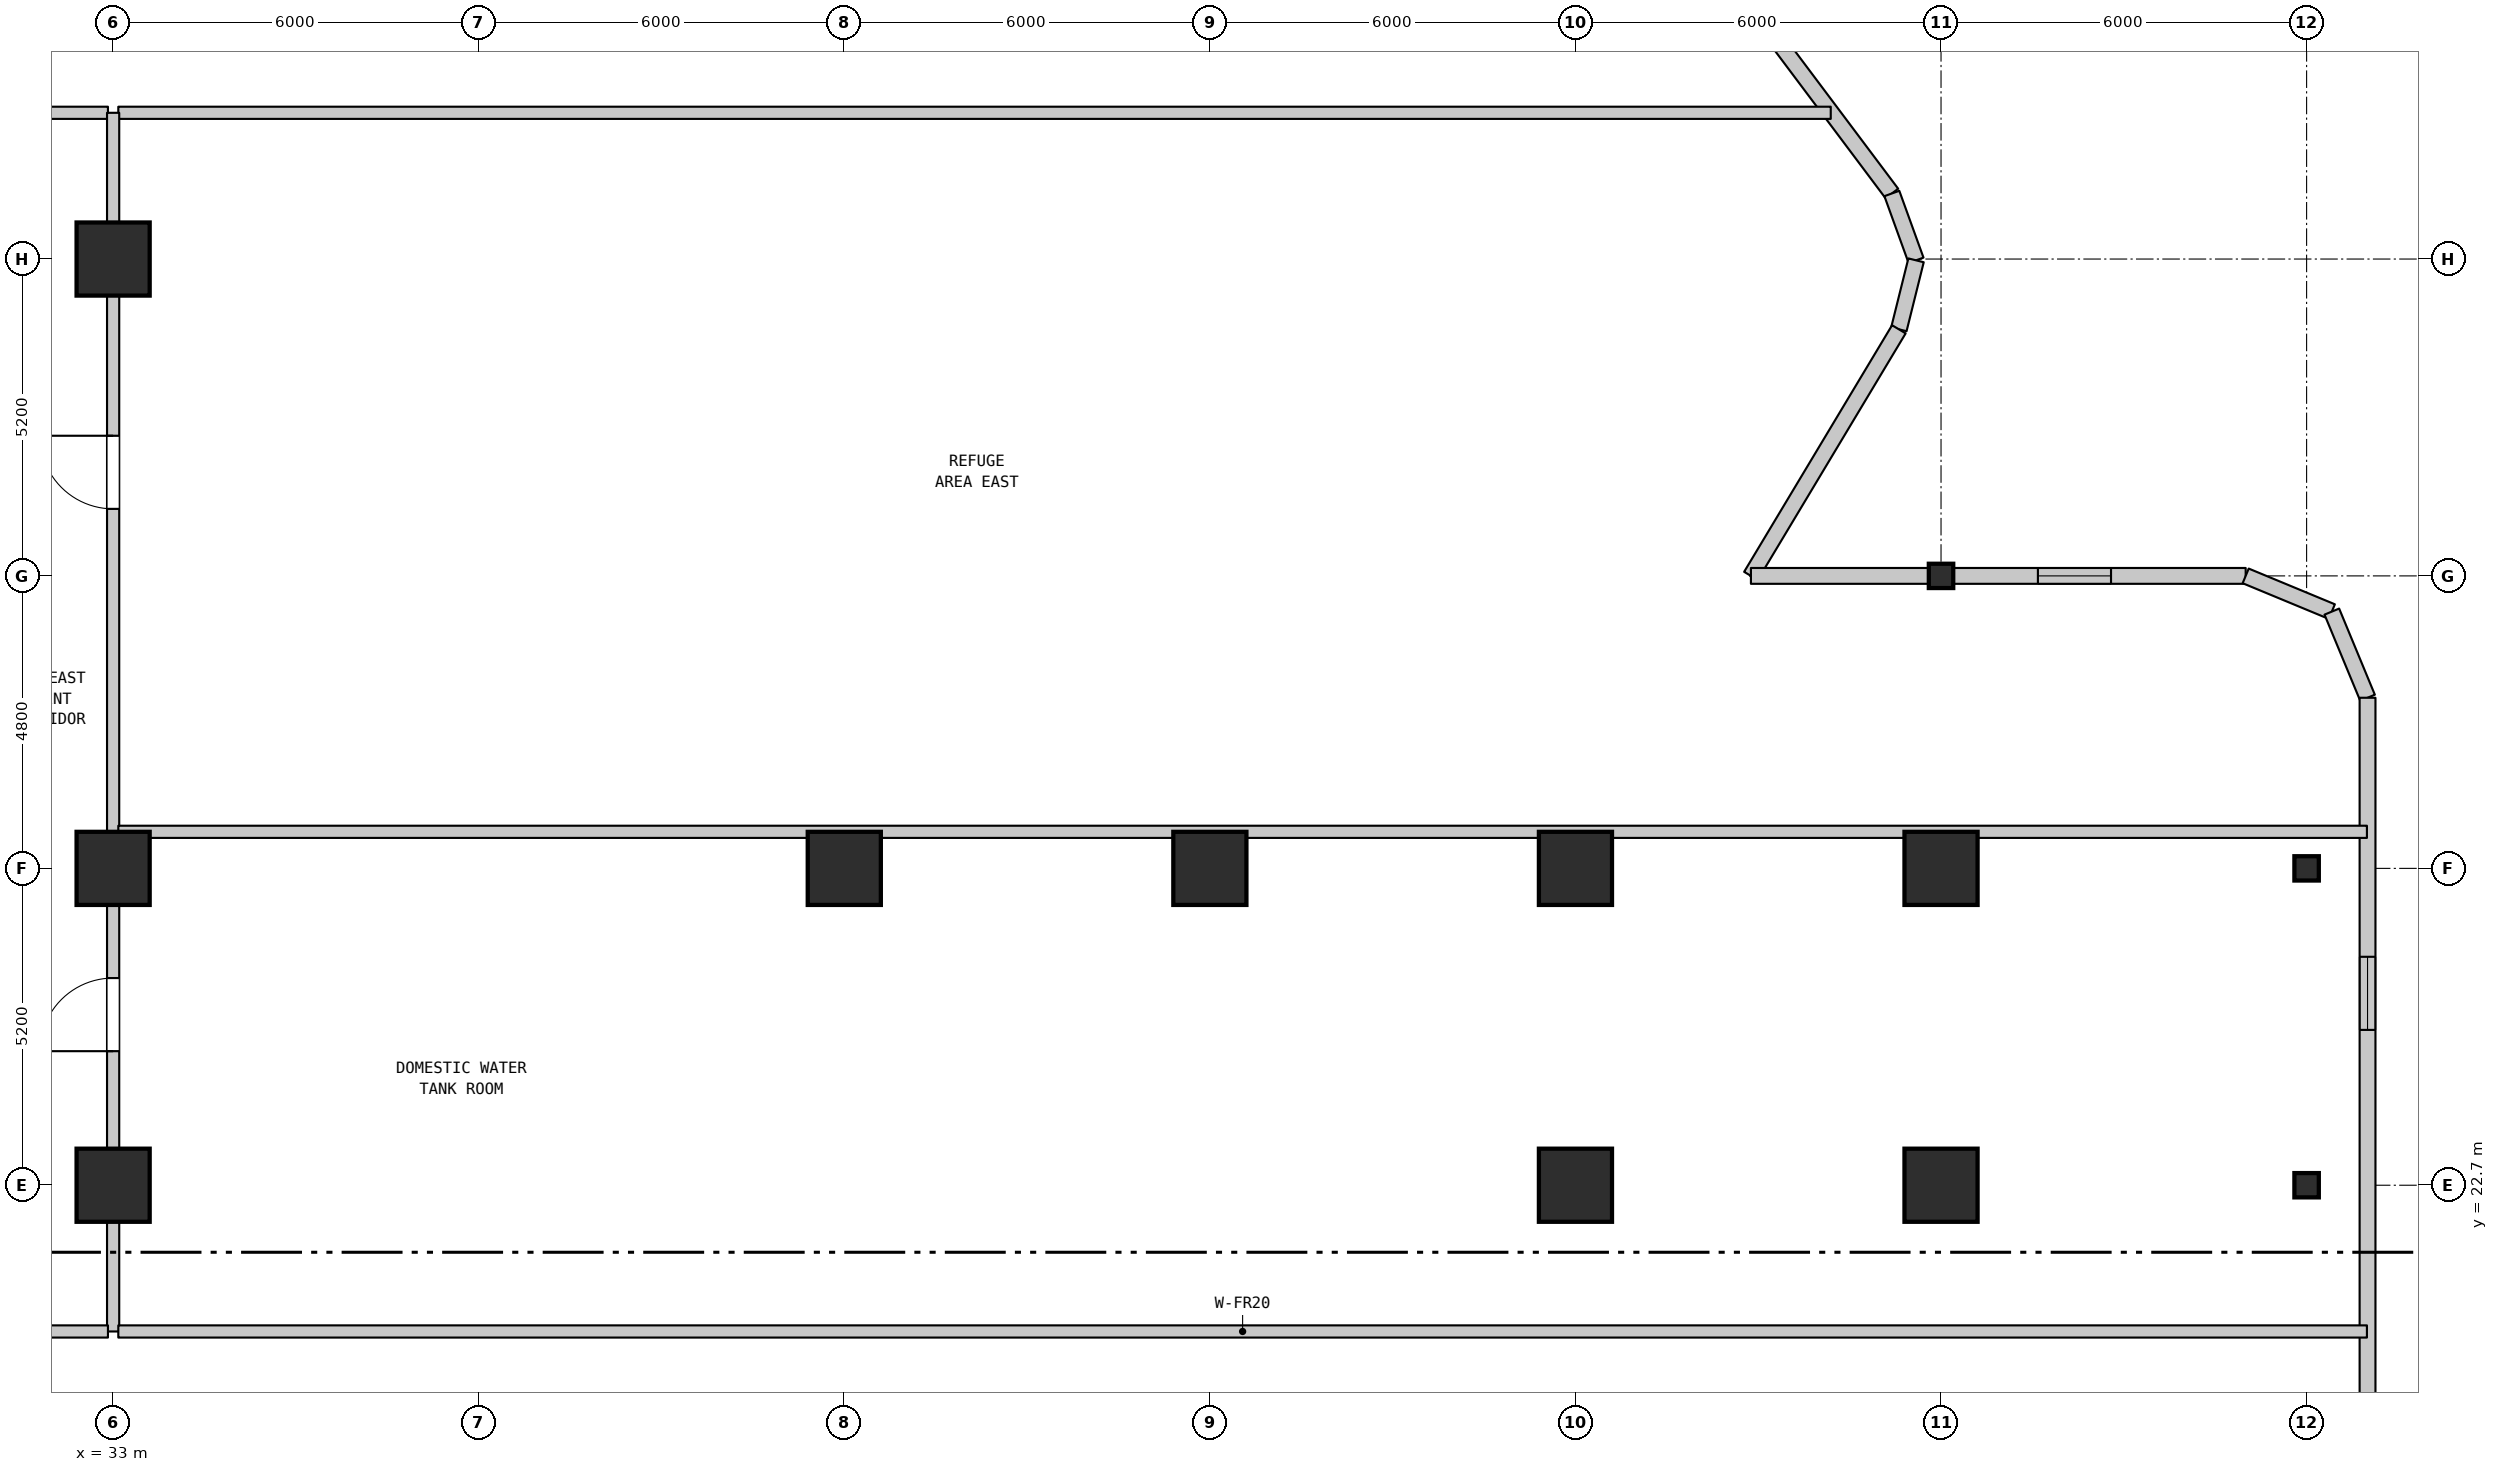
"""IFC4 building model, lengths in metres.
Left out: names, types, materials, properties, quantities, classifications, styles, units other than length and angle.
Written with IfcOpenShell. Run it as: python <this file> out.ifc"""

import sys

from ifc_helpers import new_model, si_unit, direction, frame, frame_2d, origin, origin_2d, place, context, subcontext, project, spatial, rectangle, i_section, extrude, element, fill, save


model = new_model("IFC4")
c1 = context("Model", 3, precision=1e-05, world=origin(), true_north=direction((0.0, 1.0)))
c2 = subcontext(c1, "Body", "Model", "MODEL_VIEW")
j1 = project(units=[si_unit("LENGTHUNIT", "METRE"), si_unit("PLANEANGLEUNIT", "RADIAN")], contexts=[c1])
p1 = place(None, origin())
s1 = spatial("IfcSite", under=j1, at=p1, CompositionType="ELEMENT")
p2 = place(p1, origin())
s2 = spatial("IfcBuilding", under=s1, at=p2, CompositionType="ELEMENT")
p3 = place(p2, frame((0.0, 0.0, 61.0)))
s3 = spatial("IfcBuildingStorey", under=s2, at=p3, CompositionType="ELEMENT", Elevation=61.0)
for number, where, z_axis, x_axis in (
    (1, (33.0, 22.7, 0.0), (0.0, 0.0, 1.0), (1.0, 0.0, 0.0)),
    (2, (33.0, 27.9, 0.0), (0.0, 0.0, 1.0), (1.0, 0.0, 0.0)),
    (3, (33.0, 37.9, 0.0), (0.0, 0.0, 1.0), (1.0, 0.0, 0.0)),
    (4, (45.0, 27.9, 0.0), (0.0, 0.0, 1.0), (1.0, 0.0, 0.0)),
    (5, (51.0, 27.9, 0.0), (0.0, 0.0, 1.0), (1.0, 0.0, 0.0)),
    (6, (57.0, 22.7, 0.0), (0.0, 0.0, 1.0), (1.0, 0.0, 0.0)),
    (7, (57.0, 27.9, 0.0), (0.0, 0.0, 1.0), (1.0, 0.0, 0.0)),
    (8, (63.0, 22.7, 0.0), (0.0, 0.0, 1.0), (1.0, 0.0, 0.0)),
    (9, (63.0, 27.9, 0.0), (0.0, 0.0, 1.0), (1.0, 0.0, 0.0)),
):
    element("IfcColumn", number, at=place(p3, frame(where, z_axis=z_axis, x_axis=x_axis)), inside=s3, PredefinedType="COLUMN", context=c2, shape_type="SweptSolid", body=[
        extrude(rectangle(XDim=1.2, YDim=1.2, at=origin_2d()), origin(), (0.0, 0.0, 1.0), 4.6),
    ])
for number, where, z_axis, x_axis in (
    (10, (63.0, 32.7, 0.0), (0.0, 0.0, 1.0), (1.0, 0.0, 0.0)),
    (11, (69.0, 22.7, 0.0), (0.0, 0.0, 1.0), (1.0, 0.0, 0.0)),
    (12, (69.0, 27.9, 0.0), (0.0, 0.0, 1.0), (1.0, 0.0, 0.0)),
):
    element("IfcColumn", number, at=place(p3, frame(where, z_axis=z_axis, x_axis=x_axis)), inside=s3, PredefinedType="COLUMN", context=c2, shape_type="SweptSolid", body=[
        extrude(i_section(OverallWidth=0.401, OverallDepth=0.399, WebThickness=0.025, FlangeThickness=0.04, FilletRadius=0.015, at=origin_2d()), origin(), (0.0, 0.0, 1.0), 4.6),
    ])
p4 = place(p3, frame((51.6, 53.1, 0.0), z_axis=(0.0, 0.0, 1.0), x_axis=(0.6, -0.8, 0.0)))
e13 = element("IfcWall", 13, at=p4, inside=s3, PredefinedType="STANDARD", context=c2, shape_type="SweptSolid", body=[
    extrude(rectangle(XDim=17.655, YDim=0.26, at=frame_2d((8.828, 0.0))), origin(), (0.0, 0.0, 1.0), 4.28),
])
p5 = place(p4, frame((4.014, 0.0, 1.1)))
e14 = element("IfcOpeningElement", 14, at=p5, cuts=e13, PredefinedType="OPENING", context=c2, shape_type="SweptSolid", body=[
    extrude(rectangle(XDim=1.2, YDim=1.4, at=frame_2d((0.6, 0.7))), frame((0.0, 0.14, 0.0), z_axis=(0.0, -1.0, 0.0), x_axis=(1.0, 0.0, 0.0)), (0.0, 0.0, 1.0), 0.28),
])
p6 = place(p4, frame((12.441, 0.0, 1.1)))
e15 = element("IfcOpeningElement", 15, at=p6, cuts=e13, PredefinedType="OPENING", context=c2, shape_type="SweptSolid", body=[
    extrude(rectangle(XDim=1.2, YDim=1.4, at=frame_2d((0.6, 0.7))), frame((0.0, 0.14, 0.0), z_axis=(0.0, -1.0, 0.0), x_axis=(1.0, 0.0, 0.0)), (0.0, 0.0, 1.0), 0.28),
])
p7 = place(p3, frame((62.193, 38.976, 0.0), z_axis=(0.0, 0.0, 1.0), x_axis=(0.34023056637, -0.94034204506, 0.0)))
e16 = element("IfcWall", 16, at=p7, inside=s3, PredefinedType="STANDARD", context=c2, shape_type="SweptSolid", body=[
    extrude(rectangle(XDim=1.167, YDim=0.26, at=frame_2d((0.583, 0.0))), origin(), (0.0, 0.0, 1.0), 4.28),
])
p8 = place(p3, frame((62.59, 37.879, 0.0), z_axis=(0.0, 0.0, 1.0), x_axis=(-0.241747572301, -0.970339173324, 0.0)))
e17 = element("IfcWall", 17, at=p8, inside=s3, PredefinedType="STANDARD", context=c2, shape_type="SweptSolid", body=[
    extrude(rectangle(XDim=1.167, YDim=0.26, at=frame_2d((0.583, 0.0))), origin(), (0.0, 0.0, 1.0), 4.28),
])
p9 = place(p3, frame((62.308, 36.747, 0.0), z_axis=(0.0, 0.0, 1.0), x_axis=(-0.514488148327, -0.857497489927, 0.0)))
e18 = element("IfcWall", 18, at=p9, inside=s3, PredefinedType="STANDARD", context=c2, shape_type="SweptSolid", body=[
    extrude(rectangle(XDim=4.72, YDim=0.26, at=frame_2d((2.36, 0.0))), origin(), (0.0, 0.0, 1.0), 4.28),
])
p10 = place(p3, frame((59.88, 32.7, 0.0), z_axis=(0.0, 0.0, 1.0), x_axis=(1.0, 0.0, 0.0)))
e19 = element("IfcWall", 19, at=p10, inside=s3, PredefinedType="STANDARD", context=c2, shape_type="SweptSolid", body=[
    extrude(rectangle(XDim=8.12, YDim=0.26, at=frame_2d((4.06, 0.0))), origin(), (0.0, 0.0, 1.0), 4.28),
])
p11 = place(p10, frame((4.71, 0.0, 1.1)))
e20 = element("IfcOpeningElement", 20, at=p11, cuts=e19, PredefinedType="OPENING", context=c2, shape_type="SweptSolid", body=[
    extrude(rectangle(XDim=1.2, YDim=1.4, at=frame_2d((0.6, 0.7))), frame((0.0, 0.14, 0.0), z_axis=(0.0, -1.0, 0.0), x_axis=(1.0, 0.0, 0.0)), (0.0, 0.0, 1.0), 0.28),
])
for number, where, z_axis, x_axis in (
    (21, (68.0, 32.7, 0.0), (0.0, 0.0, 1.0), (0.924, -0.383, 0.0)),
    (22, (69.414, 32.114, 0.0), (0.0, 0.0, 1.0), (0.383, -0.924, 0.0)),
):
    element("IfcWall", number, at=place(p3, frame(where, z_axis=z_axis, x_axis=x_axis)), inside=s3, PredefinedType="STANDARD", context=c2, shape_type="SweptSolid", body=[
        extrude(rectangle(XDim=1.531, YDim=0.26, at=frame_2d((0.765, 0.0))), origin(), (0.0, 0.0, 1.0), 4.28),
    ])
p12 = place(p3, frame((70.0, 30.7, 0.0), z_axis=(0.0, 0.0, 1.0), x_axis=(0.0, -1.0, 0.0)))
e23 = element("IfcWall", 23, at=p12, inside=s3, PredefinedType="STANDARD", context=c2, shape_type="SweptSolid", body=[
    extrude(rectangle(XDim=16.803, YDim=0.26, at=frame_2d((8.401, 0.0))), origin(), (0.0, 0.0, 1.0), 4.28),
])
p13 = place(p12, frame((4.251, 0.0, 1.1)))
e24 = element("IfcOpeningElement", 24, at=p13, cuts=e23, PredefinedType="OPENING", context=c2, shape_type="SweptSolid", body=[
    extrude(rectangle(XDim=1.2, YDim=1.4, at=frame_2d((0.6, 0.7))), frame((0.0, 0.14, 0.0), z_axis=(0.0, -1.0, 0.0), x_axis=(1.0, 0.0, 0.0)), (0.0, 0.0, 1.0), 0.28),
])
p14 = place(p3, frame((33.0, 20.3, 0.0), z_axis=(0.0, 0.0, 1.0), x_axis=(0.0, 1.0, 0.0)))
e25 = element("IfcWall", 25, at=p14, inside=s3, PredefinedType="STANDARD", context=c2, shape_type="SweptSolid", body=[
    extrude(rectangle(XDim=8.2, YDim=0.2, at=frame_2d((4.1, 0.0))), origin(), (0.0, 0.0, 1.0), 3.78),
])
p15 = place(p14, frame((4.6, 0.0, 0.0)))
e26 = element("IfcOpeningElement", 26, at=p15, cuts=e25, PredefinedType="OPENING", context=c2, shape_type="SweptSolid", body=[
    extrude(rectangle(XDim=1.2, YDim=2.2, at=frame_2d((0.6, 1.1))), frame((0.0, 0.11, 0.0), z_axis=(0.0, -1.0, 0.0), x_axis=(1.0, 0.0, 0.0)), (0.0, 0.0, 1.0), 0.22),
])
p16 = place(p3, frame((33.0, 28.5, 0.0), z_axis=(0.0, 0.0, 1.0), x_axis=(0.0, 1.0, 0.0)))
e27 = element("IfcWall", 27, at=p16, inside=s3, PredefinedType="STANDARD", context=c2, shape_type="SweptSolid", body=[
    extrude(rectangle(XDim=9.4, YDim=0.2, at=frame_2d((4.7, 0.0))), origin(), (0.0, 0.0, 1.0), 3.78),
])
p17 = place(p16, frame((5.3, 0.0, 0.0)))
e28 = element("IfcOpeningElement", 28, at=p17, cuts=e27, PredefinedType="OPENING", context=c2, shape_type="SweptSolid", body=[
    extrude(rectangle(XDim=1.2, YDim=2.2, at=frame_2d((0.6, 1.1))), frame((0.0, 0.11, 0.0), z_axis=(0.0, -1.0, 0.0), x_axis=(1.0, 0.0, 0.0)), (0.0, 0.0, 1.0), 0.22),
])
p18 = place(p3, frame((12.6, 20.3, 0.0), z_axis=(0.0, 0.0, 1.0), x_axis=(1.0, 0.0, 0.0)))
e29 = element("IfcWall", 29, at=p18, inside=s3, PredefinedType="STANDARD", context=c2, shape_type="SweptSolid", body=[
    extrude(rectangle(XDim=20.315, YDim=0.2, at=frame_2d((10.157, 0.0))), origin(), (0.0, 0.0, 1.0), 4.28),
])
p19 = place(p18, frame((6.8, 0.0, 0.0)))
e30 = element("IfcOpeningElement", 30, at=p19, cuts=e29, PredefinedType="OPENING", context=c2, shape_type="SweptSolid", body=[
    extrude(rectangle(XDim=1.2, YDim=2.2, at=frame_2d((0.6, 1.1))), frame((0.0, 0.11, 0.0), z_axis=(0.0, -1.0, 0.0), x_axis=(1.0, 0.0, 0.0)), (0.0, 0.0, 1.0), 0.22),
])
p20 = place(p18, frame((16.225, 0.0, 0.0)))
e31 = element("IfcOpeningElement", 31, at=p20, cuts=e29, PredefinedType="OPENING", context=c2, shape_type="SweptSolid", body=[
    extrude(rectangle(XDim=1.2, YDim=2.2, at=frame_2d((0.6, 1.1))), frame((0.0, 0.11, 0.0), z_axis=(0.0, -1.0, 0.0), x_axis=(1.0, 0.0, 0.0)), (0.0, 0.0, 1.0), 0.22),
])
for number, where, z_axis, x_axis in (
    (32, (33.085, 20.3, 0.0), (0.0, 0.0, 1.0), (1.0, 0.0, 0.0)),
    (33, (33.085, 28.5, 0.0), (0.0, 0.0, 1.0), (1.0, 0.0, 0.0)),
):
    element("IfcWall", number, at=place(p3, frame(where, z_axis=z_axis, x_axis=x_axis)), inside=s3, PredefinedType="STANDARD", context=c2, shape_type="SweptSolid", body=[
        extrude(rectangle(XDim=36.905, YDim=0.2, at=frame_2d((18.453, 0.0))), origin(), (0.0, 0.0, 1.0), 4.28),
    ])
p21 = place(p3, frame((12.685, 40.3, 0.0), z_axis=(0.0, 0.0, 1.0), x_axis=(1.0, 0.0, 0.0)))
e34 = element("IfcWall", 34, at=p21, inside=s3, PredefinedType="STANDARD", context=c2, shape_type="SweptSolid", body=[
    extrude(rectangle(XDim=20.23, YDim=0.2, at=frame_2d((10.115, 0.0))), origin(), (0.0, 0.0, 1.0), 4.28),
])
p22 = place(p21, frame((12.14, 0.0, 0.0)))
e35 = element("IfcOpeningElement", 35, at=p22, cuts=e34, PredefinedType="OPENING", context=c2, shape_type="SweptSolid", body=[
    extrude(rectangle(XDim=1.2, YDim=2.2, at=frame_2d((0.6, 1.1))), frame((0.0, 0.11, 0.0), z_axis=(0.0, -1.0, 0.0), x_axis=(1.0, 0.0, 0.0)), (0.0, 0.0, 1.0), 0.22),
])
p23 = place(p3, frame((33.085, 40.3, 0.0), z_axis=(0.0, 0.0, 1.0), x_axis=(1.0, 0.0, 0.0)))
e36 = element("IfcWall", 36, at=p23, inside=s3, PredefinedType="STANDARD", context=c2, shape_type="SweptSolid", body=[
    extrude(rectangle(XDim=28.105, YDim=0.2, at=frame_2d((14.052, 0.0))), origin(), (0.0, 0.0, 1.0), 4.28),
])
p24 = place(p3, frame((33.0, 37.9, 0.0), z_axis=(0.0, 0.0, 1.0), x_axis=(0.0, 1.0, 0.0)))
e37 = element("IfcWall", 37, at=p24, inside=s3, PredefinedType="STANDARD", context=c2, shape_type="SweptSolid", body=[
    extrude(rectangle(XDim=2.4, YDim=0.2, at=frame_2d((1.2, 0.0))), origin(), (0.0, 0.0, 1.0), 3.68),
])
p25 = place(p11, origin())
e38 = element("IfcWindow", 38, at=p25, inside=s3, PartitioningType="SINGLE_PANEL", PredefinedType="WINDOW", context=c2, shape_type="SweptSolid", body=[
    extrude(rectangle(XDim=1.2, YDim=1.4, at=frame_2d((0.6, 0.7))), frame((0.0, 0.03, 0.0), z_axis=(0.0, -1.0, 0.0), x_axis=(1.0, 0.0, 0.0)), (0.0, 0.0, 1.0), 0.06),
])
fill(e20, e38)
p26 = place(p13, origin())
e39 = element("IfcWindow", 39, at=p26, inside=s3, PartitioningType="SINGLE_PANEL", PredefinedType="WINDOW", context=c2, shape_type="SweptSolid", body=[
    extrude(rectangle(XDim=1.2, YDim=1.4, at=frame_2d((0.6, 0.7))), frame((0.0, 0.03, 0.0), z_axis=(0.0, -1.0, 0.0), x_axis=(1.0, 0.0, 0.0)), (0.0, 0.0, 1.0), 0.06),
])
fill(e24, e39)
p27 = place(p15, origin())
e40 = element("IfcDoor", 40, at=p27, inside=s3, OperationType="SINGLE_SWING_LEFT", PredefinedType="DOOR", context=c2, shape_type="SweptSolid", body=[
    extrude(rectangle(XDim=1.2, YDim=2.2, at=frame_2d((0.6, 1.1))), frame((0.0, 0.025, 0.0), z_axis=(0.0, -1.0, 0.0), x_axis=(1.0, 0.0, 0.0)), (0.0, 0.0, 1.0), 0.05),
])
fill(e26, e40)
p28 = place(p17, origin())
e41 = element("IfcDoor", 41, at=p28, inside=s3, OperationType="SINGLE_SWING_RIGHT", PredefinedType="DOOR", context=c2, shape_type="SweptSolid", body=[
    extrude(rectangle(XDim=1.2, YDim=2.2, at=frame_2d((0.6, 1.1))), frame((0.0, 0.025, 0.0), z_axis=(0.0, -1.0, 0.0), x_axis=(1.0, 0.0, 0.0)), (0.0, 0.0, 1.0), 0.05),
])
fill(e28, e41)
save(model, sys.argv[1])
